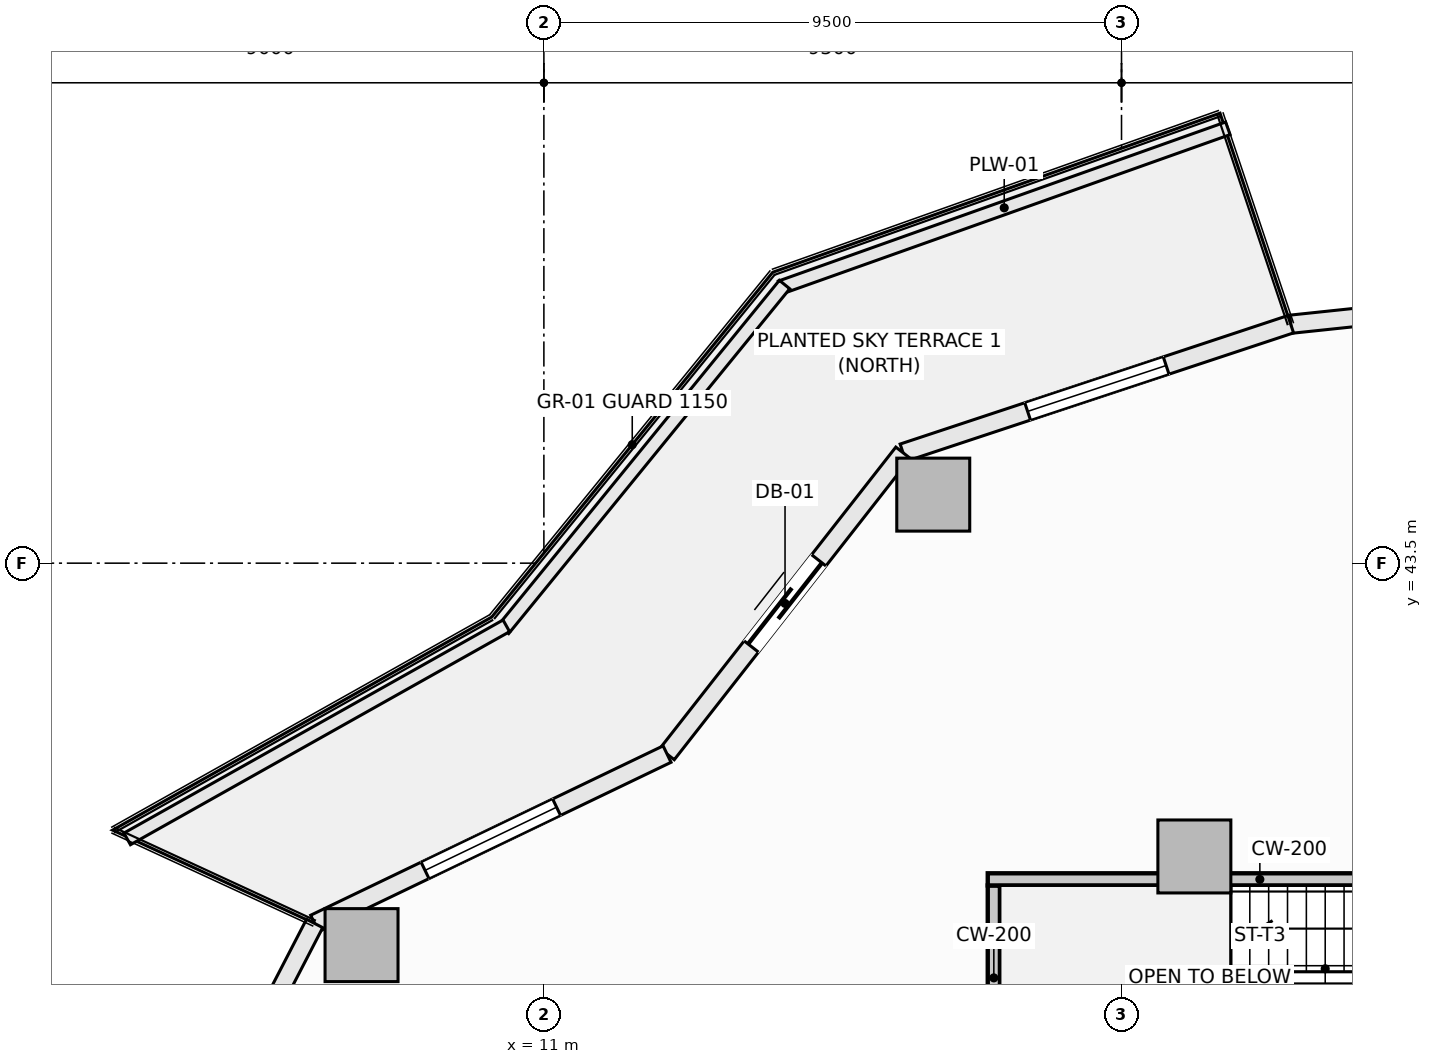
"""IFC4 building model, lengths in metres.
Left out: names, types, materials, properties, quantities, classifications, styles, units other than length and angle.
Written with IfcOpenShell. Run it as: python <this file> out.ifc"""

import sys

from ifc_helpers import new_model, si_unit, direction, frame, frame_2d, origin, origin_2d, place, context, subcontext, project, spatial, rectangle, extrude, element, fill, save


model = new_model("IFC4")
c1 = context("Model", 3, precision=1e-05, world=origin(), true_north=direction((0.0, 1.0)))
c2 = subcontext(c1, "Body", "Model", "MODEL_VIEW")
j1 = project(units=[si_unit("LENGTHUNIT", "METRE"), si_unit("PLANEANGLEUNIT", "RADIAN")], contexts=[c1])
p1 = place(None, origin())
s1 = spatial("IfcSite", under=j1, at=p1, CompositionType="ELEMENT")
p2 = place(p1, origin())
s2 = spatial("IfcBuilding", under=s1, at=p2, CompositionType="ELEMENT")
p3 = place(p2, frame((0.0, 0.0, 65.0)))
s3 = spatial("IfcBuildingStorey", under=s2, at=p3, CompositionType="ELEMENT", Elevation=65.0)
for number, where, z_axis, x_axis in (
    (1, (17.404, 44.627, -0.28), (0.0, 0.0, 1.0), (1.0, 0.0, 0.0)),
    (2, (8.001, 37.219, -0.28), (0.0, 0.0, 1.0), (1.0, 0.0, 0.0)),
    (3, (21.698, 38.677, -0.28), (0.0, 0.0, 1.0), (1.0, 0.0, 0.0)),
):
    element("IfcColumn", number, at=place(p3, frame(where, z_axis=z_axis, x_axis=x_axis)), inside=s3, PredefinedType="COLUMN", context=c2, shape_type="SweptSolid", body=[
        extrude(rectangle(XDim=1.2, YDim=1.2, at=origin_2d()), origin(), (0.0, 0.0, 1.0), 3.85),
    ])
p4 = place(p3, frame((23.282, 47.429, 0.0), z_axis=(0.0, 0.0, 1.0), x_axis=(0.994498840295, 0.104747585419, 0.0)))
e4 = element("IfcWall", 4, at=p4, inside=s3, PredefinedType="SOLIDWALL", context=c2, shape_type="SweptSolid", body=[
    extrude(rectangle(XDim=6.88, YDim=0.3, at=frame_2d((3.44, 0.0))), origin(), (0.0, 0.0, 1.0), 3.093),
])
p5 = place(p4, frame((2.24, 0.0, 0.85)))
e5 = element("IfcOpeningElement", 5, at=p5, cuts=e4, PredefinedType="OPENING", context=c2, shape_type="SweptSolid", body=[
    extrude(rectangle(XDim=2.4, YDim=1.9, at=frame_2d((1.2, 0.95))), frame((0.0, 0.16, 0.0), z_axis=(0.0, -1.0, 0.0), x_axis=(1.0, 0.0, 0.0)), (0.0, 0.0, 1.0), 0.32),
])
p6 = place(p3, frame((16.906, 45.316, 0.0), z_axis=(0.0, 0.0, 1.0), x_axis=(0.949245153629, 0.314537181127, 0.0)))
e6 = element("IfcWall", 6, at=p6, inside=s3, PredefinedType="SOLIDWALL", context=c2, shape_type="SweptSolid", body=[
    extrude(rectangle(XDim=6.717, YDim=0.3, at=frame_2d((3.358, 0.0))), origin(), (0.0, 0.0, 1.0), 3.093),
])
p7 = place(p6, frame((2.159, 0.0, 0.85)))
e7 = element("IfcOpeningElement", 7, at=p7, cuts=e6, PredefinedType="OPENING", context=c2, shape_type="SweptSolid", body=[
    extrude(rectangle(XDim=2.4, YDim=1.9, at=frame_2d((1.2, 0.95))), frame((0.0, 0.16, 0.0), z_axis=(0.0, -1.0, 0.0), x_axis=(1.0, 0.0, 0.0)), (0.0, 0.0, 1.0), 0.32),
])
p8 = place(p3, frame((13.026, 40.36, 0.0), z_axis=(0.0, 0.0, 1.0), x_axis=(0.616434798832, 0.78740595552, 0.0)))
e8 = element("IfcWall", 8, at=p8, inside=s3, PredefinedType="SOLIDWALL", context=c2, shape_type="SweptSolid", body=[
    extrude(rectangle(XDim=6.294, YDim=0.3, at=frame_2d((3.147, 0.0))), origin(), (0.0, 0.0, 1.0), 3.093),
])
p9 = place(p8, frame((2.247, 0.0, 0.0)))
e9 = element("IfcOpeningElement", 9, at=p9, cuts=e8, PredefinedType="OPENING", context=c2, shape_type="SweptSolid", body=[
    extrude(rectangle(XDim=1.8, YDim=2.25, at=frame_2d((0.9, 1.125))), frame((0.0, 0.16, 0.0), z_axis=(0.0, -1.0, 0.0), x_axis=(1.0, 0.0, 0.0)), (0.0, 0.0, 1.0), 0.32),
])
p10 = place(p3, frame((7.229, 37.575, 0.0), z_axis=(0.0, 0.0, 1.0), x_axis=(0.901354747727, 0.433081538224, 0.0)))
e10 = element("IfcWall", 10, at=p10, inside=s3, PredefinedType="SOLIDWALL", context=c2, shape_type="SweptSolid", body=[
    extrude(rectangle(XDim=6.431, YDim=0.3, at=frame_2d((3.215, 0.0))), origin(), (0.0, 0.0, 1.0), 3.093),
])
p11 = place(p10, frame((2.015, 0.0, 0.85)))
e11 = element("IfcOpeningElement", 11, at=p11, cuts=e10, PredefinedType="OPENING", context=c2, shape_type="SweptSolid", body=[
    extrude(rectangle(XDim=2.4, YDim=1.9, at=frame_2d((1.2, 0.95))), frame((0.0, 0.16, 0.0), z_axis=(0.0, -1.0, 0.0), x_axis=(1.0, 0.0, 0.0)), (0.0, 0.0, 1.0), 0.32),
])
p12 = place(p3, frame((4.588, 32.474, 0.0), z_axis=(0.0, 0.0, 1.0), x_axis=(0.459800981414, 0.888021991558, 0.0)))
e12 = element("IfcWall", 12, at=p12, inside=s3, PredefinedType="SOLIDWALL", context=c2, shape_type="SweptSolid", body=[
    extrude(rectangle(XDim=5.744, YDim=0.3, at=frame_2d((2.872, 0.0))), origin(), (0.0, 0.0, 1.0), 3.093),
])
p13 = place(p12, frame((1.672, 0.0, 0.85)))
e13 = element("IfcOpeningElement", 13, at=p13, cuts=e12, PredefinedType="OPENING", context=c2, shape_type="SweptSolid", body=[
    extrude(rectangle(XDim=2.4, YDim=1.9, at=frame_2d((1.2, 0.95))), frame((0.0, 0.16, 0.0), z_axis=(0.0, -1.0, 0.0), x_axis=(1.0, 0.0, 0.0)), (0.0, 0.0, 1.0), 0.32),
])
p14 = place(p3, frame((14.893, 48.035, 0.0), z_axis=(0.0, 0.0, 1.0), x_axis=(0.942200211781, 0.335050385643, 0.0)))
e14 = element("IfcWall", 14, at=p14, inside=s3, PredefinedType="PARAPET", context=c2, shape_type="SweptSolid", body=[
    extrude(rectangle(XDim=7.807, YDim=0.22, at=frame_2d((3.903, 0.0))), origin(), (0.0, 0.0, 1.0), 0.52),
])
p15 = place(p3, frame((10.336, 42.411, 0.0), z_axis=(0.0, 0.0, 1.0), x_axis=(0.631819273026, 0.775115737315, 0.0)))
e15 = element("IfcWall", 15, at=p15, inside=s3, PredefinedType="PARAPET", context=c2, shape_type="SweptSolid", body=[
    extrude(rectangle(XDim=7.316, YDim=0.22, at=frame_2d((3.658, 0.0))), origin(), (0.0, 0.0, 1.0), 0.52),
])
p16 = place(p3, frame((4.147, 38.966, 0.0), z_axis=(0.0, 0.0, 1.0), x_axis=(0.871775109335, 0.489906275468, 0.0)))
e16 = element("IfcWall", 16, at=p16, inside=s3, PredefinedType="PARAPET", context=c2, shape_type="SweptSolid", body=[
    extrude(rectangle(XDim=7.152, YDim=0.22, at=frame_2d((3.576, 0.0))), origin(), (0.0, 0.0, 1.0), 0.52),
])
p17 = place(p3, frame((18.4, 35.16, -0.28), z_axis=(0.0, 0.0, 1.0), x_axis=(0.0, 1.0, 0.0)))
e17 = element("IfcWall", 17, at=p17, inside=s3, PredefinedType="SHEAR", context=c2, shape_type="SweptSolid", body=[
    extrude(rectangle(XDim=3.04, YDim=0.2, at=frame_2d((1.52, 0.0))), origin(), (0.0, 0.0, 1.0), 3.85),
])
p18 = place(p3, frame((18.3, 38.3, -0.28), z_axis=(0.0, 0.0, 1.0), x_axis=(1.0, 0.0, 0.0)))
e18 = element("IfcWall", 18, at=p18, inside=s3, PredefinedType="SHEAR", context=c2, shape_type="SweptSolid", body=[
    extrude(rectangle(XDim=8.95, YDim=0.2, at=frame_2d((4.475, 0.0))), origin(), (0.0, 0.0, 1.0), 3.85),
])
p19 = place(p7, origin())
e19 = element("IfcWindow", 19, at=p19, inside=s3, PartitioningType="SINGLE_PANEL", PredefinedType="WINDOW", context=c2, shape_type="SweptSolid", body=[
    extrude(rectangle(XDim=2.4, YDim=1.9, at=frame_2d((1.2, 0.95))), frame((0.0, 0.03, 0.0), z_axis=(0.0, -1.0, 0.0), x_axis=(1.0, 0.0, 0.0)), (0.0, 0.0, 1.0), 0.06),
])
fill(e7, e19)
p20 = place(p9, origin())
e20 = element("IfcDoor", 20, at=p20, inside=s3, OperationType="SLIDING_TO_LEFT", PredefinedType="DOOR", context=c2, shape_type="SweptSolid", body=[
    extrude(rectangle(XDim=1.8, YDim=2.25, at=frame_2d((0.9, 1.125))), frame((0.0, 0.025, 0.0), z_axis=(0.0, -1.0, 0.0), x_axis=(1.0, 0.0, 0.0)), (0.0, 0.0, 1.0), 0.05),
])
fill(e9, e20)
p21 = place(p11, origin())
e21 = element("IfcWindow", 21, at=p21, inside=s3, PartitioningType="SINGLE_PANEL", PredefinedType="WINDOW", context=c2, shape_type="SweptSolid", body=[
    extrude(rectangle(XDim=2.4, YDim=1.9, at=frame_2d((1.2, 0.95))), frame((0.0, 0.03, 0.0), z_axis=(0.0, -1.0, 0.0), x_axis=(1.0, 0.0, 0.0)), (0.0, 0.0, 1.0), 0.06),
])
fill(e11, e21)
save(model, sys.argv[1])
